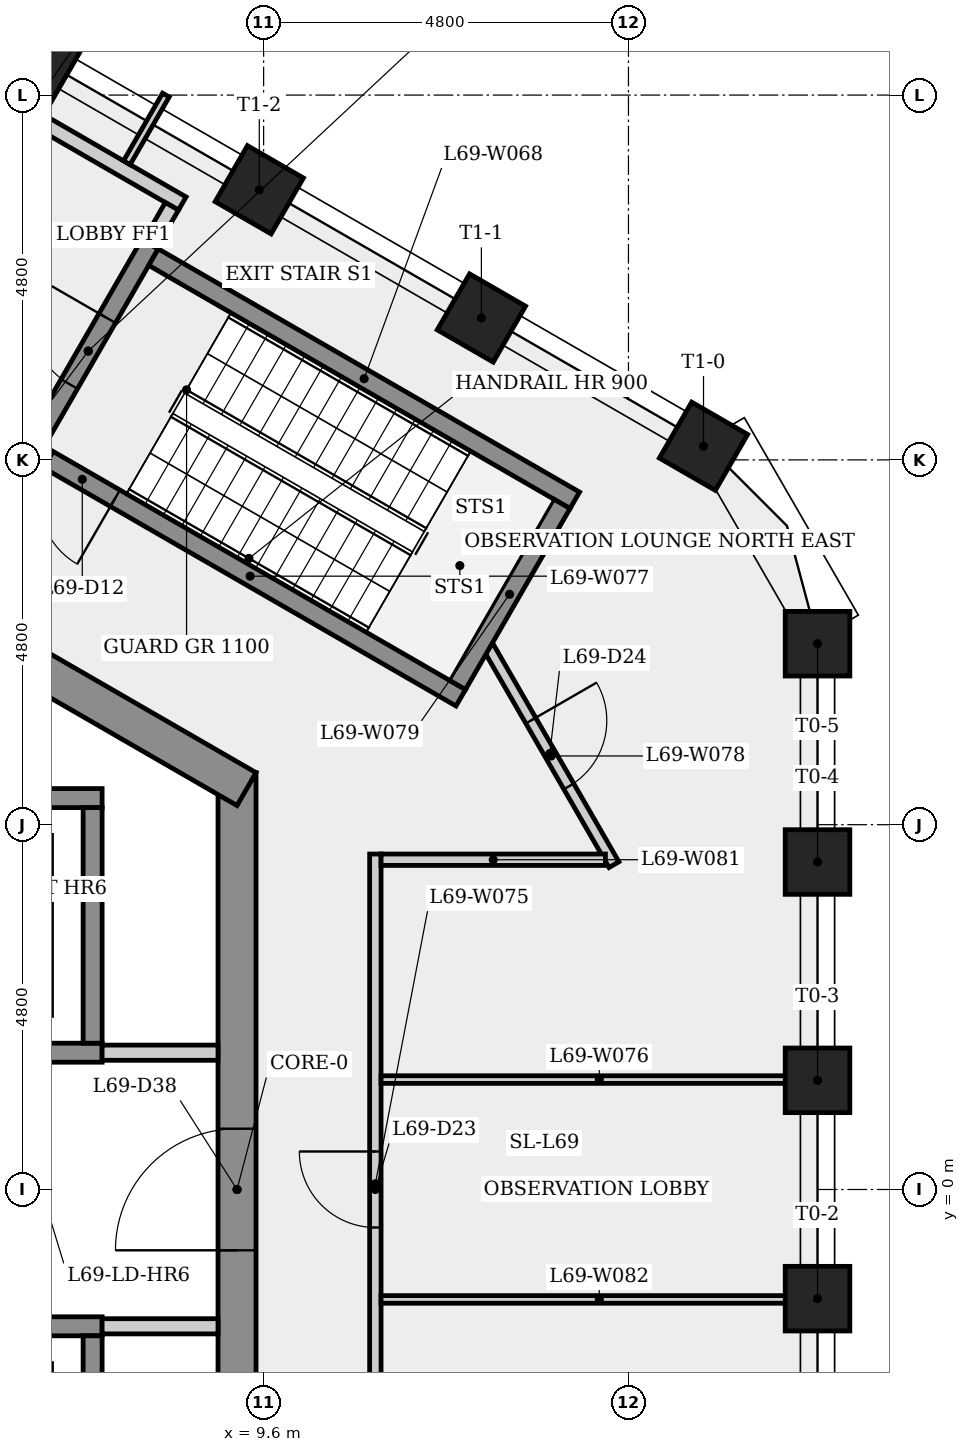
"""IFC4 building model, lengths in metres.
Left out: names, types, materials, properties, quantities, classifications, styles, units other than length and angle.
Written with IfcOpenShell. Run it as: python <this file> out.ifc"""

import sys

from ifc_helpers import new_model, si_unit, direction, frame, frame_2d, origin, origin_2d, place, context, subcontext, project, spatial, rectangle, extrude, element, fill, save


model = new_model("IFC4")
c1 = context("Model", 3, precision=1e-05, world=origin(), true_north=direction((0.0, 1.0)))
c2 = subcontext(c1, "Body", "Model", "MODEL_VIEW")
j1 = project(units=[si_unit("LENGTHUNIT", "METRE"), si_unit("PLANEANGLEUNIT", "RADIAN")], contexts=[c1])
p1 = place(None, origin())
s1 = spatial("IfcSite", under=j1, at=p1, CompositionType="ELEMENT")
p2 = place(p1, origin())
s2 = spatial("IfcBuilding", under=s1, at=p2, CompositionType="ELEMENT")
p3 = place(p2, frame((0.0, 0.0, 257.9)))
s3 = spatial("IfcBuildingStorey", under=s2, at=p3, CompositionType="ELEMENT", Elevation=257.9)
p4 = place(p3, frame((9.25, -5.485, 0.0), z_axis=(0.0, 0.0, 1.0), x_axis=(0.0, 1.0, 0.0)))
e1 = element("IfcWall", 1, at=p4, inside=s3, PredefinedType="SHEAR", context=c2, shape_type="SweptSolid", body=[
    extrude(rectangle(XDim=10.97, YDim=0.5, at=frame_2d((5.485, 0.0))), origin(), (0.0, 0.0, 1.0), 5.0),
])
p5 = place(p4, frame((4.685, 0.0, 0.0)))
e2 = element("IfcOpeningElement", 2, at=p5, cuts=e1, PredefinedType="OPENING", context=c2, shape_type="SweptSolid", body=[
    extrude(rectangle(XDim=1.6, YDim=2.1, at=frame_2d((0.8, 1.05))), frame((0.0, 0.26, 0.0), z_axis=(0.0, -1.0, 0.0), x_axis=(1.0, 0.0, 0.0)), (0.0, 0.0, 1.0), 0.52),
])
p6 = place(p3, frame((9.375, 5.268, 0.0), z_axis=(0.0, 0.0, 1.0), x_axis=(-0.866023993627, 0.500002442456, 0.0)))
e3 = element("IfcWall", 3, at=p6, inside=s3, PredefinedType="SHEAR", context=c2, shape_type="SweptSolid", body=[
    extrude(rectangle(XDim=10.97, YDim=0.5, at=frame_2d((5.485, 0.0))), origin(), (0.0, 0.0, 1.0), 5.0),
])
p7 = place(p6, frame((9.076, 0.0, 0.0)))
e4 = element("IfcOpeningElement", 4, at=p7, cuts=e3, PredefinedType="OPENING", context=c2, shape_type="SweptSolid", body=[
    extrude(rectangle(XDim=0.9, YDim=2.1, at=frame_2d((0.45, 1.05))), frame((0.0, 0.26, 0.0), z_axis=(0.0, -1.0, 0.0), x_axis=(1.0, 0.0, 0.0)), (0.0, 0.0, 1.0), 0.52),
])
p8 = place(p6, frame((3.858, 0.0, 0.0)))
e5 = element("IfcOpeningElement", 5, at=p8, cuts=e3, PredefinedType="OPENING", context=c2, shape_type="SweptSolid", body=[
    extrude(rectangle(XDim=0.9, YDim=2.1, at=frame_2d((0.45, 1.05))), frame((0.0, 0.26, 0.0), z_axis=(0.0, -1.0, 0.0), x_axis=(1.0, 0.0, 0.0)), (0.0, 0.0, 1.0), 0.52),
])
for number, where, z_axis, x_axis in (
    (6, (16.887, -1.436, 0.0), (0.0, 0.0, 1.0), (1.0, 0.0, 0.0)),
    (7, (16.887, 1.436, 0.0), (0.0, 0.0, 1.0), (1.0, 0.0, 0.0)),
    (8, (16.887, 4.309, 0.0), (0.0, 0.0, 1.0), (1.0, 0.0, 0.0)),
    (9, (16.887, 7.181, 0.0), (0.0, 0.0, 1.0), (1.0, 0.0, 0.0)),
    (10, (15.387, 9.78, 0.0), (0.0, 0.0, 1.0), (0.5, 0.866, 0.0)),
    (11, (12.465, 11.467, 0.0), (0.0, 0.0, 1.0), (0.5, 0.866, 0.0)),
    (12, (9.543, 13.154, 0.0), (0.0, 0.0, 1.0), (0.5, 0.866, 0.0)),
    (13, (6.62, 14.841, 0.0), (0.0, 0.0, 1.0), (0.5, 0.866, 0.0)),
):
    element("IfcColumn", number, at=place(p3, frame(where, z_axis=z_axis, x_axis=x_axis)), inside=s3, PredefinedType="COLUMN", context=c2, shape_type="SweptSolid", body=[
        extrude(rectangle(XDim=0.85, YDim=0.85, at=origin_2d()), origin(), (0.0, 0.0, 1.0), 5.0),
    ])
p9 = place(p3, frame((-7.475, 1.8, 0.0), z_axis=(0.0, 0.0, 1.0), x_axis=(1.0, 0.0, 0.0)))
e14 = element("IfcWall", 14, at=p9, inside=s3, PredefinedType="SHEAR", context=c2, shape_type="SweptSolid", body=[
    extrude(rectangle(XDim=14.95, YDim=0.25, at=frame_2d((7.475, 0.0))), origin(), (0.0, 0.0, 1.0), 4.6),
])
p10 = place(p9, frame((0.8, 0.0, 0.0)))
e15 = element("IfcOpeningElement", 15, at=p10, cuts=e14, PredefinedType="OPENING", context=c2, shape_type="SweptSolid", body=[
    extrude(rectangle(XDim=1.1, YDim=2.1, at=frame_2d((0.55, 1.05))), frame((0.0, 0.135, 0.0), z_axis=(0.0, -1.0, 0.0), x_axis=(1.0, 0.0, 0.0)), (0.0, 0.0, 1.0), 0.27),
])
p11 = place(p9, frame((3.25, 0.0, 0.0)))
e16 = element("IfcOpeningElement", 16, at=p11, cuts=e14, PredefinedType="OPENING", context=c2, shape_type="SweptSolid", body=[
    extrude(rectangle(XDim=1.1, YDim=2.1, at=frame_2d((0.55, 1.05))), frame((0.0, 0.135, 0.0), z_axis=(0.0, -1.0, 0.0), x_axis=(1.0, 0.0, 0.0)), (0.0, 0.0, 1.0), 0.27),
])
p12 = place(p9, frame((5.7, 0.0, 0.0)))
e17 = element("IfcOpeningElement", 17, at=p12, cuts=e14, PredefinedType="OPENING", context=c2, shape_type="SweptSolid", body=[
    extrude(rectangle(XDim=1.1, YDim=2.1, at=frame_2d((0.55, 1.05))), frame((0.0, 0.135, 0.0), z_axis=(0.0, -1.0, 0.0), x_axis=(1.0, 0.0, 0.0)), (0.0, 0.0, 1.0), 0.27),
])
p13 = place(p9, frame((8.15, 0.0, 0.0)))
e18 = element("IfcOpeningElement", 18, at=p13, cuts=e14, PredefinedType="OPENING", context=c2, shape_type="SweptSolid", body=[
    extrude(rectangle(XDim=1.1, YDim=2.1, at=frame_2d((0.55, 1.05))), frame((0.0, 0.135, 0.0), z_axis=(0.0, -1.0, 0.0), x_axis=(1.0, 0.0, 0.0)), (0.0, 0.0, 1.0), 0.27),
])
p14 = place(p9, frame((10.6, 0.0, 0.0)))
e19 = element("IfcOpeningElement", 19, at=p14, cuts=e14, PredefinedType="OPENING", context=c2, shape_type="SweptSolid", body=[
    extrude(rectangle(XDim=1.1, YDim=2.1, at=frame_2d((0.55, 1.05))), frame((0.0, 0.135, 0.0), z_axis=(0.0, -1.0, 0.0), x_axis=(1.0, 0.0, 0.0)), (0.0, 0.0, 1.0), 0.27),
])
p15 = place(p9, frame((13.05, 0.0, 0.0)))
e20 = element("IfcOpeningElement", 20, at=p15, cuts=e14, PredefinedType="OPENING", context=c2, shape_type="SweptSolid", body=[
    extrude(rectangle(XDim=1.1, YDim=2.1, at=frame_2d((0.55, 1.05))), frame((0.0, 0.135, 0.0), z_axis=(0.0, -1.0, 0.0), x_axis=(1.0, 0.0, 0.0)), (0.0, 0.0, 1.0), 0.27),
])
p16 = place(p3, frame((-7.225, 5.15, 0.0), z_axis=(0.0, 0.0, 1.0), x_axis=(1.0, 0.0, 0.0)))
e21 = element("IfcWall", 21, at=p16, inside=s3, PredefinedType="SHEAR", context=c2, shape_type="SweptSolid", body=[
    extrude(rectangle(XDim=14.7, YDim=0.25, at=frame_2d((7.35, 0.0))), origin(), (0.0, 0.0, 1.0), 4.6),
])
p17 = place(p3, frame((4.459, 15.323, 0.0), z_axis=(0.0, 0.0, 1.0), x_axis=(0.866016039709, -0.500016218704, 0.0)))
e22 = element("IfcWall", 22, at=p17, inside=s3, PredefinedType="PARTITIONING", context=c2, shape_type="SweptSolid", body=[
    extrude(rectangle(XDim=4.7, YDim=0.2, at=frame_2d((2.35, 0.0))), origin(), (0.0, 0.0, 1.0), 4.6),
])
p18 = place(p3, frame((2.575, -1.8, 0.0), z_axis=(0.0, 0.0, 1.0), x_axis=(1.0, 0.0, 0.0)))
e23 = element("IfcWall", 23, at=p18, inside=s3, PredefinedType="SHEAR", context=c2, shape_type="SweptSolid", body=[
    extrude(rectangle(XDim=4.9, YDim=0.25, at=frame_2d((2.45, 0.0))), origin(), (0.0, 0.0, 1.0), 4.6),
])
p19 = place(p18, frame((0.597, 0.0, 0.0)))
e24 = element("IfcOpeningElement", 24, at=p19, cuts=e23, PredefinedType="OPENING", context=c2, shape_type="SweptSolid", body=[
    extrude(rectangle(XDim=1.1, YDim=2.1, at=frame_2d((0.55, 1.05))), frame((0.0, 0.135, 0.0), z_axis=(0.0, -1.0, 0.0), x_axis=(1.0, 0.0, 0.0)), (0.0, 0.0, 1.0), 0.27),
])
p20 = place(p18, frame((3.0, 0.0, 0.0)))
e25 = element("IfcOpeningElement", 25, at=p20, cuts=e23, PredefinedType="OPENING", context=c2, shape_type="SweptSolid", body=[
    extrude(rectangle(XDim=1.1, YDim=2.1, at=frame_2d((0.55, 1.05))), frame((0.0, 0.135, 0.0), z_axis=(0.0, -1.0, 0.0), x_axis=(1.0, 0.0, 0.0)), (0.0, 0.0, 1.0), 0.27),
])
p21 = place(p3, frame((6.48, 9.624, 0.0), z_axis=(0.0, 0.0, 1.0), x_axis=(0.500017246033, 0.866015446554, 0.0)))
e26 = element("IfcWall", 26, at=p21, inside=s3, PredefinedType="SHEAR", context=c2, shape_type="SweptSolid", body=[
    extrude(rectangle(XDim=3.25, YDim=0.25, at=frame_2d((1.625, 0.0))), origin(), (0.0, 0.0, 1.0), 4.6),
])
p22 = place(p21, frame((1.125, 0.0, 0.0)))
e27 = element("IfcOpeningElement", 27, at=p22, cuts=e26, PredefinedType="OPENING", context=c2, shape_type="SweptSolid", body=[
    extrude(rectangle(XDim=1.0, YDim=2.1, at=frame_2d((0.5, 1.05))), frame((0.0, 0.135, 0.0), z_axis=(0.0, -1.0, 0.0), x_axis=(1.0, 0.0, 0.0)), (0.0, 0.0, 1.0), 0.27),
])
p23 = place(p3, frame((7.475, 1.8, 0.0), z_axis=(0.0, 0.0, 1.0), x_axis=(1.0, 0.0, 0.0)))
e28 = element("IfcWall", 28, at=p23, inside=s3, PredefinedType="PARTITIONING", context=c2, shape_type="SweptSolid", body=[
    extrude(rectangle(XDim=1.525, YDim=0.2, at=frame_2d((0.763, 0.0))), origin(), (0.0, 0.0, 1.0), 4.6),
])
for number, where, z_axis, x_axis in (
    (29, (7.35, -1.925, 0.0), (0.0, 0.0, 1.0), (0.0, -1.0, 0.0)),
    (30, (7.35, 5.025, 0.0), (0.0, 0.0, 1.0), (0.0, -1.0, 0.0)),
):
    element("IfcWall", number, at=place(p3, frame(where, z_axis=z_axis, x_axis=x_axis)), inside=s3, PredefinedType="SHEAR", context=c2, shape_type="SweptSolid", body=[
        extrude(rectangle(XDim=3.1, YDim=0.25, at=frame_2d((1.55, 0.0))), origin(), (0.0, 0.0, 1.0), 4.6),
    ])
p24 = place(p3, frame((7.8, 13.51, 0.0), z_axis=(0.0, 0.0, 1.0), x_axis=(0.499996600708, 0.866027366358, 0.0)))
e31 = element("IfcWall", 31, at=p24, inside=s3, PredefinedType="PARTITIONING", context=c2, shape_type="SweptSolid", body=[
    extrude(rectangle(XDim=1.028, YDim=0.1, at=frame_2d((0.514, 0.0))), origin(), (0.0, 0.0, 1.0), 4.6),
])
p25 = place(p3, frame((8.151, 12.268, 0.0), z_axis=(0.0, 0.0, 1.0), x_axis=(0.866025499775, -0.499999833739, 0.0)))
e32 = element("IfcWall", 32, at=p25, inside=s3, PredefinedType="SHEAR", context=c2, shape_type="SweptSolid", body=[
    extrude(rectangle(XDim=6.4, YDim=0.25, at=frame_2d((3.2, 0.0))), origin(), (0.0, 0.0, 1.0), 4.6),
])
p26 = place(p3, frame((8.393, 12.937, 0.0), z_axis=(0.0, 0.0, 1.0), x_axis=(-0.500065409566, -0.86598763626, 0.0)))
e33 = element("IfcWall", 33, at=p26, inside=s3, PredefinedType="PARTITIONING", context=c2, shape_type="SweptSolid", body=[
    extrude(rectangle(XDim=0.575, YDim=0.2, at=frame_2d((0.288, 0.0))), origin(), (0.0, 0.0, 1.0), 4.6),
])
p27 = place(p3, frame((9.0, -1.8, 0.0), z_axis=(0.0, 0.0, 1.0), x_axis=(-1.0, 0.0, 0.0)))
e34 = element("IfcWall", 34, at=p27, inside=s3, PredefinedType="PARTITIONING", context=c2, shape_type="SweptSolid", body=[
    extrude(rectangle(XDim=1.525, YDim=0.2, at=frame_2d((0.763, 0.0))), origin(), (0.0, 0.0, 1.0), 4.6),
])
p28 = place(p3, frame((11.07, -4.264, 0.0), z_axis=(0.0, 0.0, 1.0), x_axis=(0.0, 1.0, 0.0)))
e35 = element("IfcWall", 35, at=p28, inside=s3, PredefinedType="PARTITIONING", context=c2, shape_type="SweptSolid", body=[
    extrude(rectangle(XDim=8.678, YDim=0.15, at=frame_2d((4.339, 0.0))), origin(), (0.0, 0.0, 1.0), 4.6),
])
p29 = place(p28, frame((3.764, 0.0, 0.0)))
e36 = element("IfcOpeningElement", 36, at=p29, cuts=e35, PredefinedType="OPENING", context=c2, shape_type="SweptSolid", body=[
    extrude(rectangle(XDim=1.0, YDim=2.1, at=frame_2d((0.5, 1.05))), frame((0.0, 0.085, 0.0), z_axis=(0.0, -1.0, 0.0), x_axis=(1.0, 0.0, 0.0)), (0.0, 0.0, 1.0), 0.17),
])
p30 = place(p3, frame((11.145, 1.446, 0.0), z_axis=(0.0, 0.0, 1.0), x_axis=(1.0, 0.0, 0.0)))
e37 = element("IfcWall", 37, at=p30, inside=s3, PredefinedType="PARTITIONING", context=c2, shape_type="SweptSolid", body=[
    extrude(rectangle(XDim=5.742, YDim=0.1, at=frame_2d((2.871, 0.0))), origin(), (0.0, 0.0, 1.0), 4.6),
])
p31 = place(p3, frame((12.194, 6.47, 0.0), z_axis=(0.0, 0.0, 1.0), x_axis=(-0.866025499775, 0.499999833739, 0.0)))
e38 = element("IfcWall", 38, at=p31, inside=s3, PredefinedType="SHEAR", context=c2, shape_type="SweptSolid", body=[
    extrude(rectangle(XDim=6.4, YDim=0.25, at=frame_2d((3.2, 0.0))), origin(), (0.0, 0.0, 1.0), 4.6),
])
p32 = place(p31, frame((5.25, 0.0, 0.0)))
e39 = element("IfcOpeningElement", 39, at=p32, cuts=e38, PredefinedType="OPENING", context=c2, shape_type="SweptSolid", body=[
    extrude(rectangle(XDim=1.0, YDim=2.1, at=frame_2d((0.5, 1.05))), frame((0.0, 0.135, 0.0), z_axis=(0.0, -1.0, 0.0), x_axis=(1.0, 0.0, 0.0)), (0.0, 0.0, 1.0), 0.27),
])
p33 = place(p3, frame((12.558, 7.135, 0.0), z_axis=(0.0, 0.0, 1.0), x_axis=(0.499986929959, -0.866032949645, 0.0)))
e40 = element("IfcWall", 40, at=p33, inside=s3, PredefinedType="PARTITIONING", context=c2, shape_type="SweptSolid", body=[
    extrude(rectangle(XDim=3.303, YDim=0.15, at=frame_2d((1.651, 0.0))), origin(), (0.0, 0.0, 1.0), 4.6),
])
p34 = place(p33, frame((1.114, 0.0, 0.0)))
e41 = element("IfcOpeningElement", 41, at=p34, cuts=e40, PredefinedType="OPENING", context=c2, shape_type="SweptSolid", body=[
    extrude(rectangle(XDim=1.0, YDim=2.1, at=frame_2d((0.5, 1.05))), frame((0.0, 0.085, 0.0), z_axis=(0.0, -1.0, 0.0), x_axis=(1.0, 0.0, 0.0)), (0.0, 0.0, 1.0), 0.17),
])
p35 = place(p3, frame((12.148, 6.641, 0.0), z_axis=(0.0, 0.0, 1.0), x_axis=(0.500034990121, 0.866005201286, 0.0)))
e42 = element("IfcWall", 42, at=p35, inside=s3, PredefinedType="SHEAR", context=c2, shape_type="SweptSolid", body=[
    extrude(rectangle(XDim=2.75, YDim=0.25, at=frame_2d((1.375, 0.0))), origin(), (0.0, 0.0, 1.0), 4.6),
])
p36 = place(p3, frame((14.097, 4.339, 0.0), z_axis=(0.0, 0.0, 1.0), x_axis=(-1.0, 0.0, 0.0)))
e43 = element("IfcWall", 43, at=p36, inside=s3, PredefinedType="PARTITIONING", context=c2, shape_type="SweptSolid", body=[
    extrude(rectangle(XDim=2.952, YDim=0.15, at=frame_2d((1.476, 0.0))), origin(), (0.0, 0.0, 1.0), 4.6),
])
p37 = place(p3, frame((16.887, -1.446, 0.0), z_axis=(0.0, 0.0, 1.0), x_axis=(-1.0, 0.0, 0.0)))
e44 = element("IfcWall", 44, at=p37, inside=s3, PredefinedType="PARTITIONING", context=c2, shape_type="SweptSolid", body=[
    extrude(rectangle(XDim=5.742, YDim=0.1, at=frame_2d((2.871, 0.0))), origin(), (0.0, 0.0, 1.0), 4.6),
])
p38 = place(p32, origin())
e45 = element("IfcDoor", 45, at=p38, inside=s3, OperationType="SINGLE_SWING_LEFT", PredefinedType="DOOR", context=c2, shape_type="SweptSolid", body=[
    extrude(rectangle(XDim=1.0, YDim=2.1, at=frame_2d((0.5, 1.05))), frame((0.0, 0.025, 0.0), z_axis=(0.0, -1.0, 0.0), x_axis=(1.0, 0.0, 0.0)), (0.0, 0.0, 1.0), 0.05),
])
fill(e39, e45)
p39 = place(p22, origin())
e46 = element("IfcDoor", 46, at=p39, inside=s3, OperationType="SINGLE_SWING_RIGHT", PredefinedType="DOOR", context=c2, shape_type="SweptSolid", body=[
    extrude(rectangle(XDim=1.0, YDim=2.1, at=frame_2d((0.5, 1.05))), frame((0.0, 0.025, 0.0), z_axis=(0.0, -1.0, 0.0), x_axis=(1.0, 0.0, 0.0)), (0.0, 0.0, 1.0), 0.05),
])
fill(e27, e46)
p40 = place(p29, origin())
e47 = element("IfcDoor", 47, at=p40, inside=s3, OperationType="SINGLE_SWING_RIGHT", PredefinedType="DOOR", context=c2, shape_type="SweptSolid", body=[
    extrude(rectangle(XDim=1.0, YDim=2.1, at=frame_2d((0.5, 1.05))), frame((0.0, 0.025, 0.0), z_axis=(0.0, -1.0, 0.0), x_axis=(1.0, 0.0, 0.0)), (0.0, 0.0, 1.0), 0.05),
])
fill(e36, e47)
p41 = place(p34, origin())
e48 = element("IfcDoor", 48, at=p41, inside=s3, OperationType="SINGLE_SWING_LEFT", PredefinedType="DOOR", context=c2, shape_type="SweptSolid", body=[
    extrude(rectangle(XDim=1.0, YDim=2.1, at=frame_2d((0.5, 1.05))), frame((0.0, 0.025, 0.0), z_axis=(0.0, -1.0, 0.0), x_axis=(1.0, 0.0, 0.0)), (0.0, 0.0, 1.0), 0.05),
])
fill(e41, e48)
p42 = place(p5, origin())
e49 = element("IfcDoor", 49, at=p42, inside=s3, OperationType="SINGLE_SWING_LEFT", PredefinedType="DOOR", context=c2, shape_type="SweptSolid", body=[
    extrude(rectangle(XDim=1.6, YDim=2.1, at=frame_2d((0.8, 1.05))), frame((0.0, 0.025, 0.0), z_axis=(0.0, -1.0, 0.0), x_axis=(1.0, 0.0, 0.0)), (0.0, 0.0, 1.0), 0.05),
])
fill(e2, e49)
save(model, sys.argv[1])
